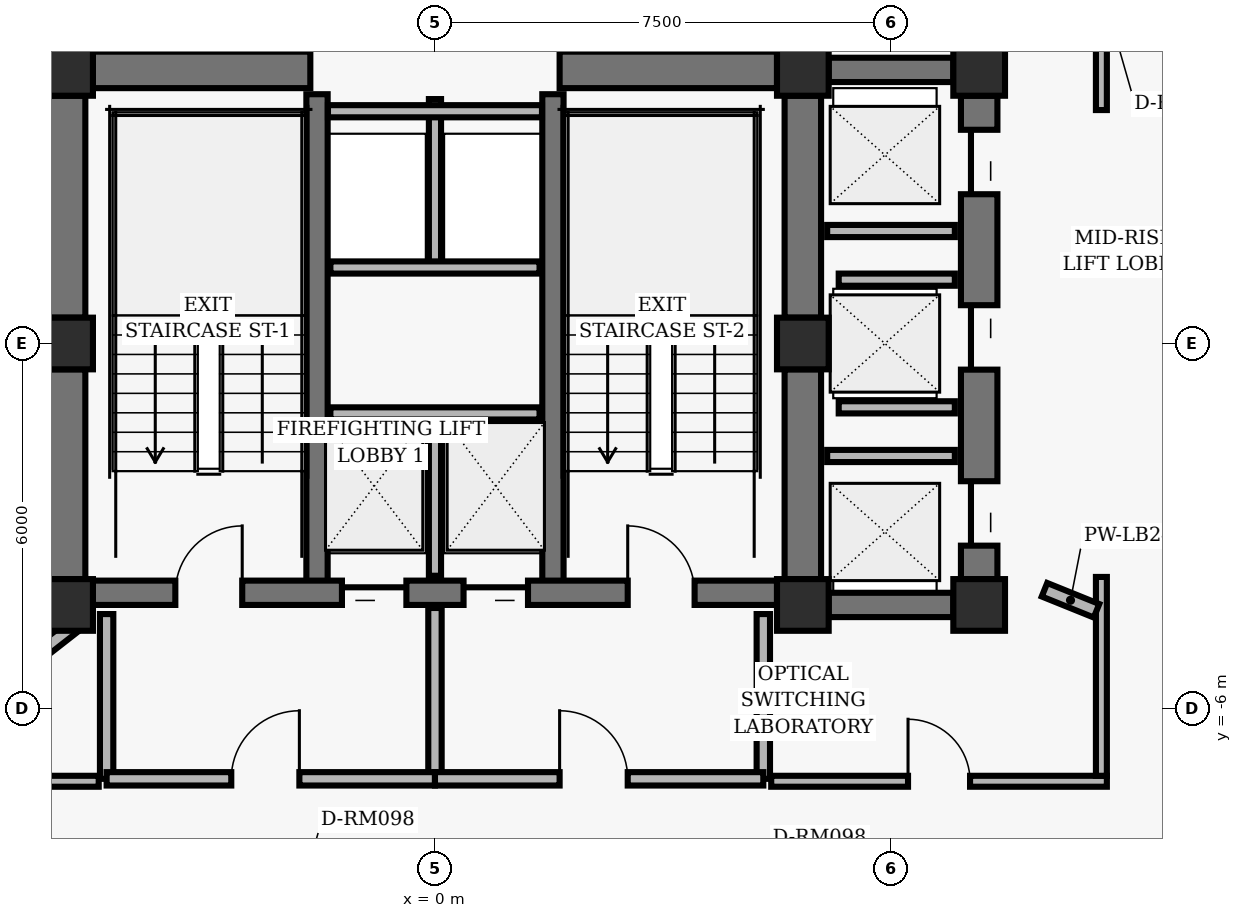
"""IFC4 building model, lengths in metres.
Left out: names, types, materials, properties, quantities, classifications, styles, units other than length and angle.
Written with IfcOpenShell. Run it as: python <this file> out.ifc"""

import sys

from ifc_helpers import new_model, si_unit, direction, frame, frame_2d, origin, origin_2d, place, context, subcontext, project, spatial, rectangle, hollow_rectangle, extrude, element, fill, save


model = new_model("IFC4")
c1 = context("Model", 3, precision=1e-05, world=origin(), true_north=direction((0.0, 1.0)))
c2 = subcontext(c1, "Body", "Model", "MODEL_VIEW")
j1 = project(units=[si_unit("LENGTHUNIT", "METRE"), si_unit("PLANEANGLEUNIT", "RADIAN")], contexts=[c1])
p1 = place(None, origin())
s1 = spatial("IfcSite", under=j1, at=p1, CompositionType="ELEMENT")
p2 = place(p1, origin())
s2 = spatial("IfcBuilding", under=s1, at=p2, CompositionType="ELEMENT")
p3 = place(p2, frame((0.0, 0.0, 104.64)))
s3 = spatial("IfcBuildingStorey", under=s2, at=p3, CompositionType="ELEMENT", Elevation=104.64)
for number, where, z_axis, x_axis in (
    (1, (-6.05, 4.5, 0.0), (0.0, 0.0, 1.0), (1.0, 0.0, 0.0)),
    (2, (6.05, 4.5, 0.0), (0.0, 0.0, 1.0), (1.0, 0.0, 0.0)),
    (3, (-6.05, 0.0, 0.0), (0.0, 0.0, 1.0), (1.0, 0.0, 0.0)),
    (4, (6.05, 0.0, 0.0), (0.0, 0.0, 1.0), (1.0, 0.0, 0.0)),
    (5, (-6.05, -4.3, 0.0), (0.0, 0.0, 1.0), (1.0, 0.0, 0.0)),
    (6, (6.05, -4.3, 0.0), (0.0, 0.0, 1.0), (1.0, 0.0, 0.0)),
    (7, (8.95, 4.5, 0.0), (0.0, 0.0, 1.0), (1.0, 0.0, 0.0)),
    (8, (8.95, -4.3, 0.0), (0.0, 0.0, 1.0), (1.0, 0.0, 0.0)),
):
    element("IfcColumn", number, at=place(p3, frame(where, z_axis=z_axis, x_axis=x_axis)), inside=s3, PredefinedType="COLUMN", context=c2, shape_type="SweptSolid", body=[
        extrude(hollow_rectangle(XDim=0.85, YDim=0.85, WallThickness=0.055, InnerFilletRadius=0.02, OuterFilletRadius=0.04, at=origin_2d()), origin(), (0.0, 0.0, 1.0), 3.04),
    ])
p4 = place(p3, frame((-6.05, 0.425, 0.0), z_axis=(0.0, 0.0, 1.0), x_axis=(0.0, 1.0, 0.0)))
e9 = element("IfcWall", 9, at=p4, inside=s3, PredefinedType="SHEAR", context=c2, shape_type="SweptSolid", body=[
    extrude(rectangle(XDim=3.65, YDim=0.6, at=frame_2d((1.825, 0.0))), origin(), (0.0, 0.0, 1.0), 2.788),
])
p5 = place(p3, frame((-6.05, -3.875, 0.0), z_axis=(0.0, 0.0, 1.0), x_axis=(0.0, 1.0, 0.0)))
e10 = element("IfcWall", 10, at=p5, inside=s3, PredefinedType="SHEAR", context=c2, shape_type="SweptSolid", body=[
    extrude(rectangle(XDim=3.45, YDim=0.6, at=frame_2d((1.725, 0.0))), origin(), (0.0, 0.0, 1.0), 2.788),
])
p6 = place(p3, frame((6.05, 0.425, 0.0), z_axis=(0.0, 0.0, 1.0), x_axis=(0.0, 1.0, 0.0)))
e11 = element("IfcWall", 11, at=p6, inside=s3, PredefinedType="SHEAR", context=c2, shape_type="SweptSolid", body=[
    extrude(rectangle(XDim=3.65, YDim=0.6, at=frame_2d((1.825, 0.0))), origin(), (0.0, 0.0, 1.0), 2.788),
])
p7 = place(p3, frame((6.05, -3.875, 0.0), z_axis=(0.0, 0.0, 1.0), x_axis=(0.0, 1.0, 0.0)))
e12 = element("IfcWall", 12, at=p7, inside=s3, PredefinedType="SHEAR", context=c2, shape_type="SweptSolid", body=[
    extrude(rectangle(XDim=3.45, YDim=0.6, at=frame_2d((1.725, 0.0))), origin(), (0.0, 0.0, 1.0), 2.788),
])
for number, where, z_axis, x_axis in (
    (13, (-1.94, -4.1, 0.0), (0.0, 0.0, 1.0), (0.0, 1.0, 0.0)),
    (14, (1.94, -4.1, 0.0), (0.0, 0.0, 1.0), (0.0, 1.0, 0.0)),
):
    element("IfcWall", number, at=place(p3, frame(where, z_axis=z_axis, x_axis=x_axis)), inside=s3, PredefinedType="SHEAR", context=c2, shape_type="SweptSolid", body=[
        extrude(rectangle(XDim=8.2, YDim=0.35, at=frame_2d((4.1, 0.0))), origin(), (0.0, 0.0, 1.0), 2.788),
    ])
p8 = place(p3, frame((-5.625, -4.1, 0.0), z_axis=(0.0, 0.0, 1.0), x_axis=(1.0, 0.0, 0.0)))
e15 = element("IfcWall", 15, at=p8, inside=s3, PredefinedType="SHEAR", context=c2, shape_type="SweptSolid", body=[
    extrude(rectangle(XDim=11.25, YDim=0.4, at=frame_2d((5.625, 0.0))), origin(), (0.0, 0.0, 1.0), 2.788),
])
p9 = place(p8, frame((1.355, 0.0, 0.0)))
e16 = element("IfcOpeningElement", 16, at=p9, cuts=e15, PredefinedType="OPENING", context=c2, shape_type="SweptSolid", body=[
    extrude(rectangle(XDim=1.1, YDim=2.04, at=frame_2d((0.55, 1.02))), frame((0.0, 0.21, 0.0), z_axis=(0.0, -1.0, 0.0), x_axis=(1.0, 0.0, 0.0)), (0.0, 0.0, 1.0), 0.42),
])
p10 = place(p8, frame((8.795, 0.0, 0.0)))
e17 = element("IfcOpeningElement", 17, at=p10, cuts=e15, PredefinedType="OPENING", context=c2, shape_type="SweptSolid", body=[
    extrude(rectangle(XDim=1.1, YDim=2.04, at=frame_2d((0.55, 1.02))), frame((0.0, 0.21, 0.0), z_axis=(0.0, -1.0, 0.0), x_axis=(1.0, 0.0, 0.0)), (0.0, 0.0, 1.0), 0.42),
])
p11 = place(p8, frame((4.095, 0.0, 0.0)))
e18 = element("IfcOpeningElement", 18, at=p11, cuts=e15, PredefinedType="OPENING", context=c2, shape_type="SweptSolid", body=[
    extrude(rectangle(XDim=1.06, YDim=2.04, at=frame_2d((0.53, 1.02))), frame((0.0, 0.21, 0.0), z_axis=(0.0, -1.0, 0.0), x_axis=(1.0, 0.0, 0.0)), (0.0, 0.0, 1.0), 0.42),
])
p12 = place(p8, frame((6.095, 0.0, 0.0)))
e19 = element("IfcOpeningElement", 19, at=p12, cuts=e15, PredefinedType="OPENING", context=c2, shape_type="SweptSolid", body=[
    extrude(rectangle(XDim=1.06, YDim=2.04, at=frame_2d((0.53, 1.02))), frame((0.0, 0.21, 0.0), z_axis=(0.0, -1.0, 0.0), x_axis=(1.0, 0.0, 0.0)), (0.0, 0.0, 1.0), 0.42),
])
for number, where, z_axis, x_axis in (
    (20, (-5.625, 4.5, 0.0), (0.0, 0.0, 1.0), (1.0, 0.0, 0.0)),
    (21, (2.05, 4.5, 0.0), (0.0, 0.0, 1.0), (1.0, 0.0, 0.0)),
):
    element("IfcWall", number, at=place(p3, frame(where, z_axis=z_axis, x_axis=x_axis)), inside=s3, PredefinedType="SHEAR", context=c2, shape_type="SweptSolid", body=[
        extrude(rectangle(XDim=3.575, YDim=0.6, at=frame_2d((1.788, 0.0))), origin(), (0.0, 0.0, 1.0), 2.788),
    ])
p13 = place(p3, frame((8.95, -3.875, 0.0), z_axis=(0.0, 0.0, 1.0), x_axis=(0.0, 1.0, 0.0)))
e22 = element("IfcWall", 22, at=p13, inside=s3, PredefinedType="SHEAR", context=c2, shape_type="SweptSolid", body=[
    extrude(rectangle(XDim=7.95, YDim=0.6, at=frame_2d((3.975, 0.0))), origin(), (0.0, 0.0, 1.0), 2.788),
])
p14 = place(p13, frame((0.55, 0.0, 0.0)))
e23 = element("IfcOpeningElement", 23, at=p14, cuts=e22, PredefinedType="OPENING", context=c2, shape_type="SweptSolid", body=[
    extrude(rectangle(XDim=1.06, YDim=2.04, at=frame_2d((0.53, 1.02))), frame((0.0, 0.31, 0.0), z_axis=(0.0, -1.0, 0.0), x_axis=(1.0, 0.0, 0.0)), (0.0, 0.0, 1.0), 0.62),
])
p15 = place(p13, frame((3.445, 0.0, 0.0)))
e24 = element("IfcOpeningElement", 24, at=p15, cuts=e22, PredefinedType="OPENING", context=c2, shape_type="SweptSolid", body=[
    extrude(rectangle(XDim=1.06, YDim=2.04, at=frame_2d((0.53, 1.02))), frame((0.0, 0.31, 0.0), z_axis=(0.0, -1.0, 0.0), x_axis=(1.0, 0.0, 0.0)), (0.0, 0.0, 1.0), 0.62),
])
p16 = place(p13, frame((6.33, 0.0, 0.0)))
e25 = element("IfcOpeningElement", 25, at=p16, cuts=e22, PredefinedType="OPENING", context=c2, shape_type="SweptSolid", body=[
    extrude(rectangle(XDim=1.06, YDim=2.04, at=frame_2d((0.53, 1.02))), frame((0.0, 0.31, 0.0), z_axis=(0.0, -1.0, 0.0), x_axis=(1.0, 0.0, 0.0)), (0.0, 0.0, 1.0), 0.62),
])
for number, where, z_axis, x_axis in (
    (26, (6.475, 4.5, 0.0), (0.0, 0.0, 1.0), (1.0, 0.0, 0.0)),
    (27, (6.475, -4.3, 0.0), (0.0, 0.0, 1.0), (1.0, 0.0, 0.0)),
):
    element("IfcWall", number, at=place(p3, frame(where, z_axis=z_axis, x_axis=x_axis)), inside=s3, PredefinedType="SHEAR", context=c2, shape_type="SweptSolid", body=[
        extrude(rectangle(XDim=2.05, YDim=0.4, at=frame_2d((1.025, 0.0))), origin(), (0.0, 0.0, 1.0), 2.788),
    ])
p17 = place(p3, frame((0.0, -3.82, 0.0), z_axis=(0.0, 0.0, 1.0), x_axis=(0.0, 1.0, 0.0)))
e28 = element("IfcWall", 28, at=p17, inside=s3, PredefinedType="PARTITIONING", context=c2, shape_type="SweptSolid", body=[
    extrude(rectangle(XDim=2.67, YDim=0.2, at=frame_2d((1.335, 0.0))), origin(), (0.0, 0.0, 1.0), 2.763),
])
p18 = place(p3, frame((-1.72, -1.15, 0.0), z_axis=(0.0, 0.0, 1.0), x_axis=(1.0, 0.0, 0.0)))
e29 = element("IfcWall", 29, at=p18, inside=s3, PredefinedType="PARTITIONING", context=c2, shape_type="SweptSolid", body=[
    extrude(rectangle(XDim=3.44, YDim=0.2, at=frame_2d((1.72, 0.0))), origin(), (0.0, 0.0, 1.0), 2.763),
])
for number, where, z_axis, x_axis in (
    (30, (-5.4, -7.16, 0.0), (0.0, 0.0, 1.0), (0.0, 1.0, 0.0)),
    (31, (5.4, -7.16, 0.0), (0.0, 0.0, 1.0), (0.0, 1.0, 0.0)),
):
    element("IfcWall", number, at=place(p3, frame(where, z_axis=z_axis, x_axis=x_axis)), inside=s3, PredefinedType="PARTITIONING", context=c2, shape_type="SweptSolid", body=[
        extrude(rectangle(XDim=2.71, YDim=0.22, at=frame_2d((1.355, 0.0))), origin(), (0.0, 0.0, 1.0), 2.763),
    ])
p19 = place(p3, frame((0.0, -7.16, 0.0), z_axis=(0.0, 0.0, 1.0), x_axis=(0.0, 1.0, 0.0)))
e32 = element("IfcWall", 32, at=p19, inside=s3, PredefinedType="PARTITIONING", context=c2, shape_type="SweptSolid", body=[
    extrude(rectangle(XDim=2.81, YDim=0.22, at=frame_2d((1.405, 0.0))), origin(), (0.0, 0.0, 1.0), 2.763),
])
p20 = place(p3, frame((-5.4, -7.16, 0.0), z_axis=(0.0, 0.0, 1.0), x_axis=(1.0, 0.0, 0.0)))
e33 = element("IfcWall", 33, at=p20, inside=s3, PredefinedType="PARTITIONING", context=c2, shape_type="SweptSolid", body=[
    extrude(rectangle(XDim=5.4, YDim=0.22, at=frame_2d((2.7, 0.0))), origin(), (0.0, 0.0, 1.0), 2.33),
])
p21 = place(p20, frame((2.05, 0.0, 0.0)))
e34 = element("IfcOpeningElement", 34, at=p21, cuts=e33, PredefinedType="OPENING", context=c2, shape_type="SweptSolid", body=[
    extrude(rectangle(XDim=1.12, YDim=2.02, at=frame_2d((0.56, 1.01))), frame((0.0, 0.12, 0.0), z_axis=(0.0, -1.0, 0.0), x_axis=(1.0, 0.0, 0.0)), (0.0, 0.0, 1.0), 0.24),
])
p22 = place(p3, frame((0.0, -7.16, 0.0), z_axis=(0.0, 0.0, 1.0), x_axis=(1.0, 0.0, 0.0)))
e35 = element("IfcWall", 35, at=p22, inside=s3, PredefinedType="PARTITIONING", context=c2, shape_type="SweptSolid", body=[
    extrude(rectangle(XDim=5.4, YDim=0.22, at=frame_2d((2.7, 0.0))), origin(), (0.0, 0.0, 1.0), 2.33),
])
p23 = place(p22, frame((2.05, 0.0, 0.0)))
e36 = element("IfcOpeningElement", 36, at=p23, cuts=e35, PredefinedType="OPENING", context=c2, shape_type="SweptSolid", body=[
    extrude(rectangle(XDim=1.12, YDim=2.02, at=frame_2d((0.56, 1.01))), frame((0.0, 0.12, 0.0), z_axis=(0.0, -1.0, 0.0), x_axis=(1.0, 0.0, 0.0)), (0.0, 0.0, 1.0), 0.24),
])
p24 = place(p3, frame((0.0, 1.25, 0.0), z_axis=(0.0, 0.0, 1.0), x_axis=(0.0, 1.0, 0.0)))
e37 = element("IfcWall", 37, at=p24, inside=s3, PredefinedType="PARTITIONING", context=c2, shape_type="SweptSolid", body=[
    extrude(rectangle(XDim=2.77, YDim=0.2, at=frame_2d((1.385, 0.0))), origin(), (0.0, 0.0, 1.0), 2.763),
])
p25 = place(p3, frame((-1.72, 1.25, 0.0), z_axis=(0.0, 0.0, 1.0), x_axis=(1.0, 0.0, 0.0)))
e38 = element("IfcWall", 38, at=p25, inside=s3, PredefinedType="PARTITIONING", context=c2, shape_type="SweptSolid", body=[
    extrude(rectangle(XDim=3.44, YDim=0.2, at=frame_2d((1.72, 0.0))), origin(), (0.0, 0.0, 1.0), 2.763),
])
p26 = place(p3, frame((-1.76, 3.82, 0.0), z_axis=(0.0, 0.0, 1.0), x_axis=(1.0, 0.0, 0.0)))
e39 = element("IfcWall", 39, at=p26, inside=s3, PredefinedType="PARTITIONING", context=c2, shape_type="SweptSolid", body=[
    extrude(rectangle(XDim=3.52, YDim=0.2, at=frame_2d((1.76, 0.0))), origin(), (0.0, 0.0, 1.0), 2.763),
])
for number, where, z_axis, x_axis in (
    (40, (6.45, -1.85, 0.0), (0.0, 0.0, 1.0), (1.0, 0.0, 0.0)),
    (41, (6.45, 1.85, 0.0), (0.0, 0.0, 1.0), (1.0, 0.0, 0.0)),
):
    element("IfcWall", number, at=place(p3, frame(where, z_axis=z_axis, x_axis=x_axis)), inside=s3, PredefinedType="PARTITIONING", context=c2, shape_type="SweptSolid", body=[
        extrude(rectangle(XDim=2.1, YDim=0.2, at=frame_2d((1.05, 0.0))), origin(), (0.0, 0.0, 1.0), 2.763),
    ])
for number, where, z_axis, x_axis in (
    (42, (6.64, -1.05, 0.0), (0.0, 0.0, 1.0), (1.0, 0.0, 0.0)),
    (43, (6.64, 1.05, 0.0), (0.0, 0.0, 1.0), (1.0, 0.0, 0.0)),
):
    element("IfcWall", number, at=place(p3, frame(where, z_axis=z_axis, x_axis=x_axis)), inside=s3, PredefinedType="PARTITIONING", context=c2, shape_type="SweptSolid", body=[
        extrude(rectangle(XDim=1.91, YDim=0.2, at=frame_2d((0.955, 0.0))), origin(), (0.0, 0.0, 1.0), 2.763),
    ])
p27 = place(p3, frame((10.263, 9.077, 0.0), z_axis=(0.0, 0.0, 1.0), x_axis=(0.587780951295, -0.809020119215, 0.0)))
e44 = element("IfcWall", 44, at=p27, inside=s3, PredefinedType="PARTITIONING", context=c2, shape_type="SweptSolid", body=[
    extrude(rectangle(XDim=7.469, YDim=0.18, at=frame_2d((3.734, 0.0))), origin(), (0.0, 0.0, 1.0), 2.763),
])
p28 = place(p3, frame((5.53, -7.2, 0.0), z_axis=(0.0, 0.0, 1.0), x_axis=(1.0, 0.0, 0.0)))
e45 = element("IfcWall", 45, at=p28, inside=s3, PredefinedType="PARTITIONING", context=c2, shape_type="SweptSolid", body=[
    extrude(rectangle(XDim=5.52, YDim=0.18, at=frame_2d((2.76, 0.0))), origin(), (0.0, 0.0, 1.0), 2.33),
])
p29 = place(p28, frame((2.25, 0.0, 0.0)))
e46 = element("IfcOpeningElement", 46, at=p29, cuts=e45, PredefinedType="OPENING", context=c2, shape_type="SweptSolid", body=[
    extrude(rectangle(XDim=1.02, YDim=2.02, at=frame_2d((0.51, 1.01))), frame((0.0, 0.1, 0.0), z_axis=(0.0, -1.0, 0.0), x_axis=(1.0, 0.0, 0.0)), (0.0, 0.0, 1.0), 0.2),
])
p30 = place(p3, frame((10.96, -7.11, 0.0), z_axis=(0.0, 0.0, 1.0), x_axis=(0.0, 1.0, 0.0)))
e47 = element("IfcWall", 47, at=p30, inside=s3, PredefinedType="PARTITIONING", context=c2, shape_type="SweptSolid", body=[
    extrude(rectangle(XDim=3.271, YDim=0.18, at=frame_2d((1.635, 0.0))), origin(), (0.0, 0.0, 1.0), 2.763),
])
p31 = place(p3, frame((10.96, 3.84, 0.0), z_axis=(0.0, 0.0, 1.0), x_axis=(0.0, 1.0, 0.0)))
e48 = element("IfcWall", 48, at=p31, inside=s3, PredefinedType="PARTITIONING", context=c2, shape_type="SweptSolid", body=[
    extrude(rectangle(XDim=3.271, YDim=0.18, at=frame_2d((1.635, 0.0))), origin(), (0.0, 0.0, 1.0), 2.763),
])
p32 = place(p31, frame((1.155, 0.0, 0.0)))
e49 = element("IfcOpeningElement", 49, at=p32, cuts=e48, PredefinedType="OPENING", context=c2, shape_type="SweptSolid", body=[
    extrude(rectangle(XDim=0.96, YDim=2.02, at=frame_2d((0.48, 1.01))), frame((0.0, 0.1, 0.0), z_axis=(0.0, -1.0, 0.0), x_axis=(1.0, 0.0, 0.0)), (0.0, 0.0, 1.0), 0.2),
])
p33 = place(p3, frame((-6.59, -7.2, 0.0), z_axis=(0.0, 0.0, 1.0), x_axis=(1.0, 0.0, 0.0)))
e50 = element("IfcWall", 50, at=p33, inside=s3, PredefinedType="PARTITIONING", context=c2, shape_type="SweptSolid", body=[
    extrude(rectangle(XDim=1.06, YDim=0.18, at=frame_2d((0.53, 0.0))), origin(), (0.0, 0.0, 1.0), 2.33),
])
p34 = place(p3, frame((-5.836, -4.56, 0.0), z_axis=(0.0, 0.0, 1.0), x_axis=(-0.788054366409, -0.615605649408, 0.0)))
e51 = element("IfcWall", 51, at=p34, inside=s3, PredefinedType="PARTITIONING", context=c2, shape_type="SweptSolid", body=[
    extrude(rectangle(XDim=0.74, YDim=0.24, at=frame_2d((0.37, 0.0))), origin(), (0.0, 0.0, 1.0), 2.132),
])
p35 = place(p3, frame((10.024, -4.05, 0.0), z_axis=(0.0, 0.0, 1.0), x_axis=(0.927194137639, -0.374581140912, 0.0)))
e52 = element("IfcWall", 52, at=p35, inside=s3, PredefinedType="PARTITIONING", context=c2, shape_type="SweptSolid", body=[
    extrude(rectangle(XDim=0.923, YDim=0.24, at=frame_2d((0.461, 0.0))), origin(), (0.0, 0.0, 1.0), 2.763),
])
p36 = place(p9, origin())
e53 = element("IfcDoor", 53, at=p36, inside=s3, OperationType="SINGLE_SWING_RIGHT", PredefinedType="DOOR", context=c2, shape_type="SweptSolid", body=[
    extrude(rectangle(XDim=1.1, YDim=2.04, at=frame_2d((0.55, 1.02))), frame((0.0, 0.025, 0.0), z_axis=(0.0, -1.0, 0.0), x_axis=(1.0, 0.0, 0.0)), (0.0, 0.0, 1.0), 0.05),
])
fill(e16, e53)
p37 = place(p10, origin())
e54 = element("IfcDoor", 54, at=p37, inside=s3, OperationType="SINGLE_SWING_LEFT", PredefinedType="DOOR", context=c2, shape_type="SweptSolid", body=[
    extrude(rectangle(XDim=1.1, YDim=2.04, at=frame_2d((0.55, 1.02))), frame((0.0, 0.025, 0.0), z_axis=(0.0, -1.0, 0.0), x_axis=(1.0, 0.0, 0.0)), (0.0, 0.0, 1.0), 0.05),
])
fill(e17, e54)
p38 = place(p11, origin())
e55 = element("IfcDoor", 55, at=p38, inside=s3, OperationType="SLIDING_TO_LEFT", PredefinedType="DOOR", context=c2, shape_type="SweptSolid", body=[
    extrude(rectangle(XDim=1.06, YDim=2.04, at=frame_2d((0.53, 1.02))), frame((0.0, 0.025, 0.0), z_axis=(0.0, -1.0, 0.0), x_axis=(1.0, 0.0, 0.0)), (0.0, 0.0, 1.0), 0.05),
])
fill(e18, e55)
p39 = place(p12, origin())
e56 = element("IfcDoor", 56, at=p39, inside=s3, OperationType="SLIDING_TO_RIGHT", PredefinedType="DOOR", context=c2, shape_type="SweptSolid", body=[
    extrude(rectangle(XDim=1.06, YDim=2.04, at=frame_2d((0.53, 1.02))), frame((0.0, 0.025, 0.0), z_axis=(0.0, -1.0, 0.0), x_axis=(1.0, 0.0, 0.0)), (0.0, 0.0, 1.0), 0.05),
])
fill(e19, e56)
p40 = place(p21, origin())
e57 = element("IfcDoor", 57, at=p40, inside=s3, OperationType="SINGLE_SWING_RIGHT", PredefinedType="DOOR", context=c2, shape_type="SweptSolid", body=[
    extrude(rectangle(XDim=1.12, YDim=2.02, at=frame_2d((0.56, 1.01))), frame((0.0, 0.025, 0.0), z_axis=(0.0, -1.0, 0.0), x_axis=(1.0, 0.0, 0.0)), (0.0, 0.0, 1.0), 0.05),
])
fill(e34, e57)
p41 = place(p23, origin())
e58 = element("IfcDoor", 58, at=p41, inside=s3, OperationType="SINGLE_SWING_LEFT", PredefinedType="DOOR", context=c2, shape_type="SweptSolid", body=[
    extrude(rectangle(XDim=1.12, YDim=2.02, at=frame_2d((0.56, 1.01))), frame((0.0, 0.025, 0.0), z_axis=(0.0, -1.0, 0.0), x_axis=(1.0, 0.0, 0.0)), (0.0, 0.0, 1.0), 0.05),
])
fill(e36, e58)
p42 = place(p14, origin())
e59 = element("IfcDoor", 59, at=p42, inside=s3, OperationType="SLIDING_TO_LEFT", PredefinedType="DOOR", context=c2, shape_type="SweptSolid", body=[
    extrude(rectangle(XDim=1.06, YDim=2.04, at=frame_2d((0.53, 1.02))), frame((0.0, 0.025, 0.0), z_axis=(0.0, -1.0, 0.0), x_axis=(1.0, 0.0, 0.0)), (0.0, 0.0, 1.0), 0.05),
])
fill(e23, e59)
p43 = place(p15, origin())
e60 = element("IfcDoor", 60, at=p43, inside=s3, OperationType="SLIDING_TO_RIGHT", PredefinedType="DOOR", context=c2, shape_type="SweptSolid", body=[
    extrude(rectangle(XDim=1.06, YDim=2.04, at=frame_2d((0.53, 1.02))), frame((0.0, 0.025, 0.0), z_axis=(0.0, -1.0, 0.0), x_axis=(1.0, 0.0, 0.0)), (0.0, 0.0, 1.0), 0.05),
])
fill(e24, e60)
p44 = place(p16, origin())
e61 = element("IfcDoor", 61, at=p44, inside=s3, OperationType="SLIDING_TO_LEFT", PredefinedType="DOOR", context=c2, shape_type="SweptSolid", body=[
    extrude(rectangle(XDim=1.06, YDim=2.04, at=frame_2d((0.53, 1.02))), frame((0.0, 0.025, 0.0), z_axis=(0.0, -1.0, 0.0), x_axis=(1.0, 0.0, 0.0)), (0.0, 0.0, 1.0), 0.05),
])
fill(e25, e61)
p45 = place(p29, origin())
e62 = element("IfcDoor", 62, at=p45, inside=s3, OperationType="SINGLE_SWING_LEFT", PredefinedType="DOOR", context=c2, shape_type="SweptSolid", body=[
    extrude(rectangle(XDim=1.02, YDim=2.02, at=frame_2d((0.51, 1.01))), frame((0.0, 0.025, 0.0), z_axis=(0.0, -1.0, 0.0), x_axis=(1.0, 0.0, 0.0)), (0.0, 0.0, 1.0), 0.05),
])
fill(e46, e62)
save(model, sys.argv[1])
